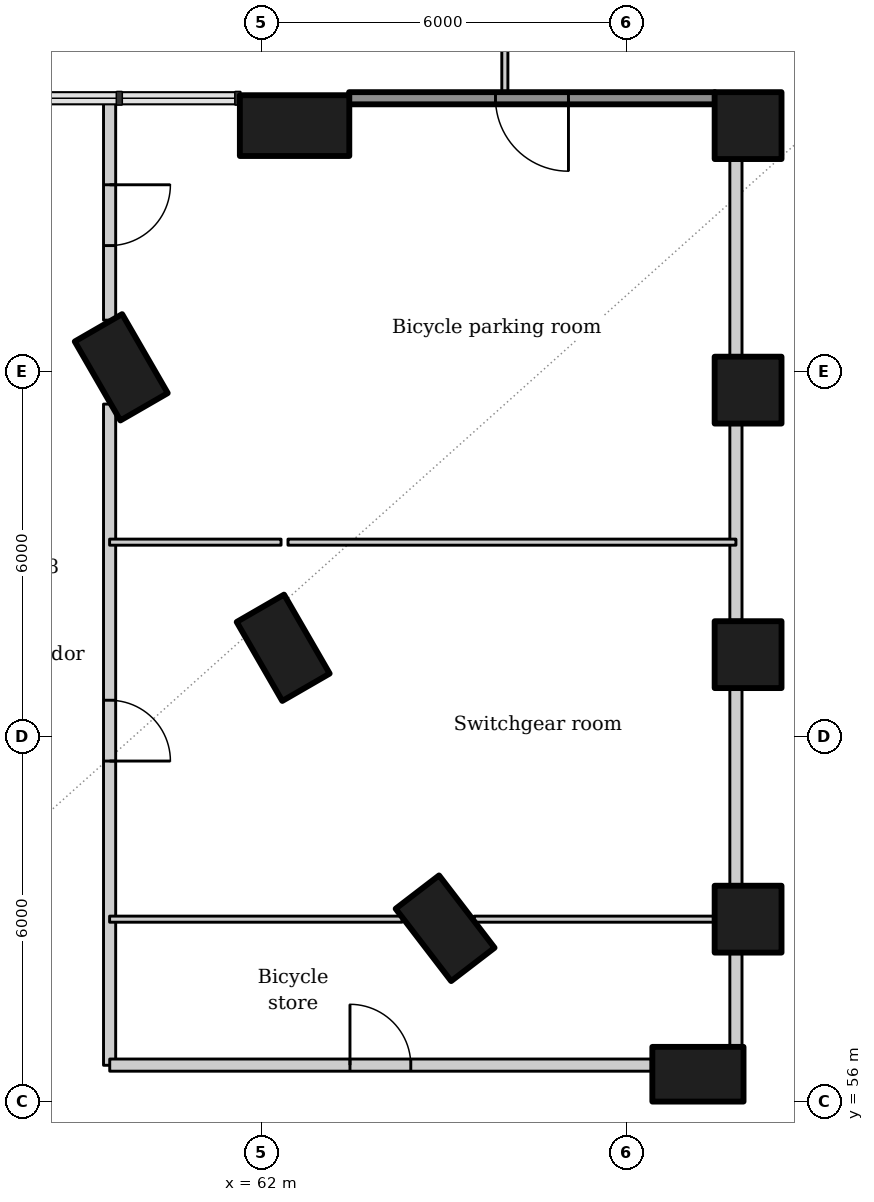
"""IFC4 building model, lengths in metres.
Left out: names, types, materials, properties, quantities, classifications, styles, units other than length and angle.
Written with IfcOpenShell. Run it as: python <this file> out.ifc"""

import sys

from ifc_helpers import new_model, si_unit, direction, frame, frame_2d, origin, origin_2d, place, context, subcontext, project, spatial, rectangle, extrude, element, fill, save


model = new_model("IFC4")
c1 = context("Model", 3, precision=1e-05, world=origin(), true_north=direction((0.0, 1.0)))
c2 = subcontext(c1, "Body", "Model", "MODEL_VIEW")
j1 = project(units=[si_unit("LENGTHUNIT", "METRE"), si_unit("PLANEANGLEUNIT", "RADIAN")], contexts=[c1])
p1 = place(None, origin())
s1 = spatial("IfcSite", under=j1, at=p1, CompositionType="ELEMENT")
p2 = place(p1, origin())
s2 = spatial("IfcBuilding", under=s1, at=p2, CompositionType="ELEMENT")
p3 = place(p2, origin())
s3 = spatial("IfcBuildingStorey", under=s2, at=p3, CompositionType="ELEMENT", Elevation=0.0)
for number, where, z_axis, x_axis in (
    (1, (59.692, 68.075, -1.8), (0.0, 0.0, 1.0), (0.5, -0.866, 0.0)),
    (2, (62.354, 63.463, -1.8), (0.0, 0.0, 1.0), (0.5, -0.866, 0.0)),
    (3, (65.018, 58.851, -1.8), (0.0, 0.0, 1.0), (0.609, -0.793, 0.0)),
    (4, (69.175, 56.45, -1.8), (0.0, 0.0, 1.0), (1.0, 0.0, 0.0)),
):
    element("IfcColumn", number, at=place(p3, frame(where, z_axis=z_axis, x_axis=x_axis)), inside=s3, PredefinedType="COLUMN", context=c2, shape_type="SweptSolid", body=[
        extrude(rectangle(XDim=1.5, YDim=0.9, at=origin_2d()), origin(), (0.0, 0.0, 1.0), 8.4),
    ])
for number, where, z_axis, x_axis in (
    (5, (70.0, 72.05, -1.8), (0.0, 0.0, 1.0), (0.0, -1.0, 0.0)),
    (6, (70.0, 67.7, -1.8), (0.0, 0.0, 1.0), (0.0, -1.0, 0.0)),
    (7, (70.0, 63.35, -1.8), (0.0, 0.0, 1.0), (0.0, -1.0, 0.0)),
    (8, (70.0, 59.0, -1.8), (0.0, 0.0, 1.0), (0.0, -1.0, 0.0)),
):
    element("IfcColumn", number, at=place(p3, frame(where, z_axis=z_axis, x_axis=x_axis)), inside=s3, PredefinedType="COLUMN", context=c2, shape_type="SweptSolid", body=[
        extrude(rectangle(XDim=1.1, YDim=1.1, at=origin_2d()), origin(), (0.0, 0.0, 1.0), 8.4),
    ])
p4 = place(p3, frame((62.542, 72.05, -1.8), z_axis=(0.0, 0.0, 1.0), x_axis=(1.0, 0.0, 0.0)))
e9 = element("IfcColumn", 9, at=p4, inside=s3, PredefinedType="COLUMN", context=c2, shape_type="SweptSolid", body=[
    extrude(rectangle(XDim=1.8, YDim=1.0, at=origin_2d()), origin(), (0.0, 0.0, 1.0), 8.4),
])
p5 = place(p3, frame((69.454, 72.5, 0.0), z_axis=(0.0, 0.0, 1.0), x_axis=(-1.0, 0.0, 0.0)))
e10 = element("IfcWall", 10, at=p5, inside=s3, PredefinedType="SOLIDWALL", context=c2, shape_type="SweptSolid", body=[
    extrude(rectangle(XDim=6.016, YDim=0.2, at=frame_2d((3.008, 0.0))), origin(), (0.0, 0.0, 1.0), 5.4),
])
p6 = place(p5, frame((2.408, 0.0, 0.0)))
e11 = element("IfcOpeningElement", 11, at=p6, cuts=e10, PredefinedType="OPENING", context=c2, shape_type="SweptSolid", body=[
    extrude(rectangle(XDim=1.2, YDim=2.4, at=frame_2d((0.6, 1.2))), frame((0.0, 0.11, 0.0), z_axis=(0.0, -1.0, 0.0), x_axis=(1.0, 0.0, 0.0)), (0.0, 0.0, 1.0), 0.22),
])
p7 = place(p3, frame((59.5, 67.47, 0.0), z_axis=(0.0, 0.0, 1.0), x_axis=(0.0, -1.0, 0.0)))
e12 = element("IfcWall", 12, at=p7, inside=s3, PredefinedType="PARTITIONING", context=c2, shape_type="SweptSolid", body=[
    extrude(rectangle(XDim=10.873, YDim=0.2, at=frame_2d((5.437, 0.0))), origin(), (0.0, 0.0, 1.0), 6.3),
])
p8 = place(p7, frame((4.87, 0.0, 0.0)))
e13 = element("IfcOpeningElement", 13, at=p8, cuts=e12, PredefinedType="OPENING", context=c2, shape_type="SweptSolid", body=[
    extrude(rectangle(XDim=1.0, YDim=2.1, at=frame_2d((0.5, 1.05))), frame((0.0, 0.11, 0.0), z_axis=(0.0, -1.0, 0.0), x_axis=(1.0, 0.0, 0.0)), (0.0, 0.0, 1.0), 0.22),
])
p9 = place(p3, frame((59.5, 72.42, 0.0), z_axis=(0.0, 0.0, 1.0), x_axis=(0.0, -1.0, 0.0)))
e14 = element("IfcWall", 14, at=p9, inside=s3, PredefinedType="PARTITIONING", context=c2, shape_type="SweptSolid", body=[
    extrude(rectangle(XDim=3.569, YDim=0.2, at=frame_2d((1.785, 0.0))), origin(), (0.0, 0.0, 1.0), 5.53),
])
p10 = place(p9, frame((1.343, 0.0, 0.0)))
e15 = element("IfcOpeningElement", 15, at=p10, cuts=e14, PredefinedType="OPENING", context=c2, shape_type="SweptSolid", body=[
    extrude(rectangle(XDim=1.0, YDim=2.1, at=frame_2d((0.5, 1.05))), frame((0.0, 0.11, 0.0), z_axis=(0.0, -1.0, 0.0), x_axis=(1.0, 0.0, 0.0)), (0.0, 0.0, 1.0), 0.22),
])
p11 = place(p3, frame((69.8, 56.917, 0.0), z_axis=(0.0, 0.0, 1.0), x_axis=(0.0, 1.0, 0.0)))
e16 = element("IfcWall", 16, at=p11, inside=s3, PredefinedType="PARTITIONING", context=c2, shape_type="SweptSolid", body=[
    extrude(rectangle(XDim=1.516, YDim=0.2, at=frame_2d((0.758, 0.0))), origin(), (0.0, 0.0, 1.0), 6.3),
])
for number, where, z_axis, x_axis in (
    (17, (69.8, 59.567, 0.0), (0.0, 0.0, 1.0), (0.0, 1.0, 0.0)),
    (18, (69.8, 63.917, 0.0), (0.0, 0.0, 1.0), (0.0, 1.0, 0.0)),
):
    element("IfcWall", number, at=place(p3, frame(where, z_axis=z_axis, x_axis=x_axis)), inside=s3, PredefinedType="PARTITIONING", context=c2, shape_type="SweptSolid", body=[
        extrude(rectangle(XDim=3.216, YDim=0.2, at=frame_2d((1.608, 0.0))), origin(), (0.0, 0.0, 1.0), 5.53),
    ])
p12 = place(p3, frame((69.8, 68.267, 0.0), z_axis=(0.0, 0.0, 1.0), x_axis=(0.0, 1.0, 0.0)))
e19 = element("IfcWall", 19, at=p12, inside=s3, PredefinedType="PARTITIONING", context=c2, shape_type="SweptSolid", body=[
    extrude(rectangle(XDim=3.216, YDim=0.2, at=frame_2d((1.608, 0.0))), origin(), (0.0, 0.0, 1.0), 5.53),
])
p13 = place(p3, frame((59.502, 56.6, 0.0), z_axis=(0.0, 0.0, 1.0), x_axis=(1.0, 0.0, 0.0)))
e20 = element("IfcWall", 20, at=p13, inside=s3, PredefinedType="PARTITIONING", context=c2, shape_type="SweptSolid", body=[
    extrude(rectangle(XDim=8.906, YDim=0.2, at=frame_2d((4.453, 0.0))), origin(), (0.0, 0.0, 1.0), 6.3),
])
p14 = place(p13, frame((3.951, 0.0, 0.0)))
e21 = element("IfcOpeningElement", 21, at=p14, cuts=e20, PredefinedType="OPENING", context=c2, shape_type="SweptSolid", body=[
    extrude(rectangle(XDim=1.0, YDim=2.1, at=frame_2d((0.5, 1.05))), frame((0.0, 0.11, 0.0), z_axis=(0.0, -1.0, 0.0), x_axis=(1.0, 0.0, 0.0)), (0.0, 0.0, 1.0), 0.22),
])
p15 = place(p3, frame((59.5, 65.2, 0.0), z_axis=(0.0, 0.0, 1.0), x_axis=(1.0, 0.0, 0.0)))
e22 = element("IfcWall", 22, at=p15, inside=s3, PredefinedType="PARTITIONING", context=c2, shape_type="SweptSolid", body=[
    extrude(rectangle(XDim=2.82, YDim=0.1, at=frame_2d((1.41, 0.0))), origin(), (0.0, 0.0, 1.0), 5.38),
])
p16 = place(p3, frame((62.434, 65.2, 0.0), z_axis=(0.0, 0.0, 1.0), x_axis=(1.0, 0.0, 0.0)))
e23 = element("IfcWall", 23, at=p16, inside=s3, PredefinedType="PARTITIONING", context=c2, shape_type="SweptSolid", body=[
    extrude(rectangle(XDim=7.366, YDim=0.1, at=frame_2d((3.683, 0.0))), origin(), (0.0, 0.0, 1.0), 6.3),
])
p17 = place(p3, frame((59.5, 59.0, 0.0), z_axis=(0.0, 0.0, 1.0), x_axis=(1.0, 0.0, 0.0)))
e24 = element("IfcWall", 24, at=p17, inside=s3, PredefinedType="PARTITIONING", context=c2, shape_type="SweptSolid", body=[
    extrude(rectangle(XDim=4.81, YDim=0.1, at=frame_2d((2.405, 0.0))), origin(), (0.0, 0.0, 1.0), 6.3),
])
p18 = place(p3, frame((65.495, 59.0, 0.0), z_axis=(0.0, 0.0, 1.0), x_axis=(1.0, 0.0, 0.0)))
e25 = element("IfcWall", 25, at=p18, inside=s3, PredefinedType="PARTITIONING", context=c2, shape_type="SweptSolid", body=[
    extrude(rectangle(XDim=3.935, YDim=0.1, at=frame_2d((1.967, 0.0))), origin(), (0.0, 0.0, 1.0), 6.3),
])
p19 = place(p3, frame((66.0, 72.6, 0.0), z_axis=(0.0, 0.0, 1.0), x_axis=(0.0, 1.0, 0.0)))
e26 = element("IfcWall", 26, at=p19, inside=s3, PredefinedType="PARTITIONING", context=c2, shape_type="SweptSolid", body=[
    extrude(rectangle(XDim=14.8, YDim=0.1, at=frame_2d((7.4, 0.0))), origin(), (0.0, 0.0, 1.0), 6.3),
])
p20 = place(p19, frame((6.65, 0.0, 0.0)))
e27 = element("IfcOpeningElement", 27, at=p20, cuts=e26, PredefinedType="OPENING", context=c2, shape_type="SweptSolid", body=[
    extrude(rectangle(XDim=1.5, YDim=2.1, at=frame_2d((0.75, 1.05))), frame((0.0, 0.06, 0.0), z_axis=(0.0, -1.0, 0.0), x_axis=(1.0, 0.0, 0.0)), (0.0, 0.0, 1.0), 0.12),
])
p21 = place(p6, origin())
e28 = element("IfcDoor", 28, at=p21, inside=s3, OperationType="SINGLE_SWING_LEFT", PredefinedType="DOOR", context=c2, shape_type="SweptSolid", body=[
    extrude(rectangle(XDim=1.2, YDim=2.4, at=frame_2d((0.6, 1.2))), frame((0.0, 0.025, 0.0), z_axis=(0.0, -1.0, 0.0), x_axis=(1.0, 0.0, 0.0)), (0.0, 0.0, 1.0), 0.05),
])
fill(e11, e28)
p22 = place(p10, origin())
e29 = element("IfcDoor", 29, at=p22, inside=s3, OperationType="SINGLE_SWING_LEFT", PredefinedType="DOOR", context=c2, shape_type="SweptSolid", body=[
    extrude(rectangle(XDim=1.0, YDim=2.1, at=frame_2d((0.5, 1.05))), frame((0.0, 0.025, 0.0), z_axis=(0.0, -1.0, 0.0), x_axis=(1.0, 0.0, 0.0)), (0.0, 0.0, 1.0), 0.05),
])
fill(e15, e29)
p23 = place(p8, origin())
e30 = element("IfcDoor", 30, at=p23, inside=s3, OperationType="SINGLE_SWING_RIGHT", PredefinedType="DOOR", context=c2, shape_type="SweptSolid", body=[
    extrude(rectangle(XDim=1.0, YDim=2.1, at=frame_2d((0.5, 1.05))), frame((0.0, 0.025, 0.0), z_axis=(0.0, -1.0, 0.0), x_axis=(1.0, 0.0, 0.0)), (0.0, 0.0, 1.0), 0.05),
])
fill(e13, e30)
p24 = place(p14, origin())
e31 = element("IfcDoor", 31, at=p24, inside=s3, OperationType="SINGLE_SWING_LEFT", PredefinedType="DOOR", context=c2, shape_type="SweptSolid", body=[
    extrude(rectangle(XDim=1.0, YDim=2.1, at=frame_2d((0.5, 1.05))), frame((0.0, 0.025, 0.0), z_axis=(0.0, -1.0, 0.0), x_axis=(1.0, 0.0, 0.0)), (0.0, 0.0, 1.0), 0.05),
])
fill(e21, e31)
save(model, sys.argv[1])
